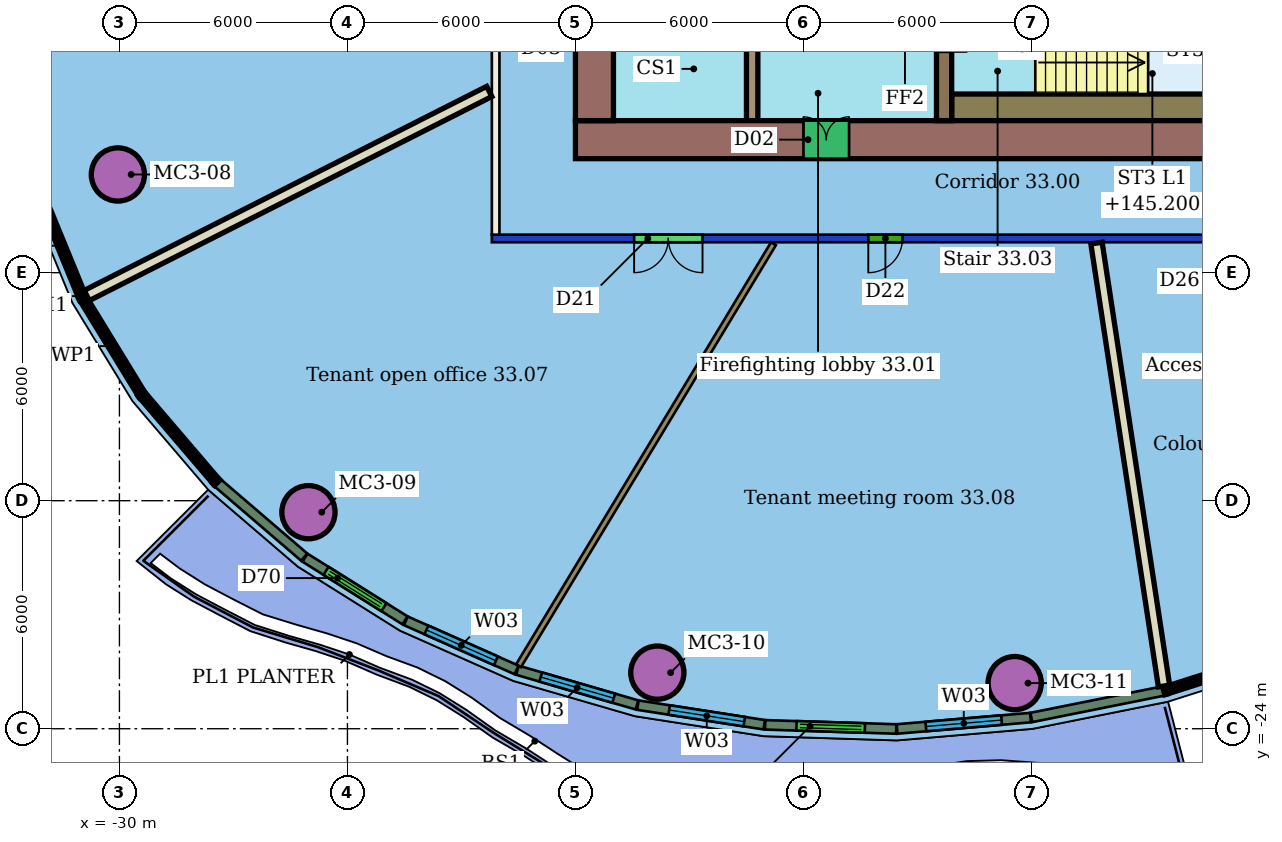
"""IFC4 building model, lengths in metres.
Left out: names, types, materials, properties, quantities, classifications, styles, units other than length and angle.
Written with IfcOpenShell. Run it as: python <this file> out.ifc"""

import sys

from ifc_helpers import new_model, si_unit, direction, frame, frame_2d, origin, origin_2d, place, context, subcontext, project, spatial, rectangle, hollow_circle, extrude, element, fill, save


model = new_model("IFC4")
c1 = context("Model", 3, precision=1e-05, world=origin(), true_north=direction((0.0, 1.0)))
c2 = subcontext(c1, "Body", "Model", "MODEL_VIEW")
j1 = project(units=[si_unit("LENGTHUNIT", "METRE"), si_unit("PLANEANGLEUNIT", "RADIAN")], contexts=[c1])
p1 = place(None, origin())
s1 = spatial("IfcSite", under=j1, at=p1, CompositionType="ELEMENT")
p2 = place(p1, origin())
s2 = spatial("IfcBuilding", under=s1, at=p2, CompositionType="ELEMENT")
p3 = place(p2, frame((0.0, 0.0, 143.4)))
s3 = spatial("IfcBuildingStorey", under=s2, at=p3, CompositionType="ELEMENT", Elevation=143.4)
for number, where, z_axis, x_axis in (
    (1, (-30.041, -9.417, 0.0), (0.0, 0.0, 1.0), (1.0, 0.0, 0.0)),
    (2, (-25.026, -18.303, 0.0), (0.0, 0.0, 1.0), (1.0, 0.0, 0.0)),
    (3, (-15.845, -22.524, 0.0), (0.0, 0.0, 1.0), (1.0, 0.0, 0.0)),
    (4, (-6.442, -22.8, 0.0), (0.0, 0.0, 1.0), (1.0, 0.0, 0.0)),
):
    element("IfcColumn", number, at=place(p3, frame(where, z_axis=z_axis, x_axis=x_axis)), inside=s3, PredefinedType="COLUMN", context=c2, shape_type="SweptSolid", body=[
        extrude(hollow_circle(Radius=0.7, WallThickness=0.05, at=origin_2d()), origin(), (0.0, 0.0, 1.0), 3.45),
    ])
p4 = place(p3, frame((8.2, -11.1, 0.0), z_axis=(0.0, 0.0, 1.0), x_axis=(-1.0, 0.0, 0.0)))
e5 = element("IfcWall", 5, at=p4, inside=s3, PredefinedType="PARTITIONING", context=c2, shape_type="SweptSolid", body=[
    extrude(rectangle(XDim=28.4, YDim=0.2, at=frame_2d((14.2, 0.0))), origin(), (0.0, 0.0, 1.0), 3.05),
])
p5 = place(p4, frame((22.856, 0.0, 0.0)))
e6 = element("IfcOpeningElement", 6, at=p5, cuts=e5, PredefinedType="OPENING", context=c2, shape_type="SweptSolid", body=[
    extrude(rectangle(XDim=1.8, YDim=2.1, at=frame_2d((0.9, 1.05))), frame((0.0, 0.11, 0.0), z_axis=(0.0, -1.0, 0.0), x_axis=(1.0, 0.0, 0.0)), (0.0, 0.0, 1.0), 0.22),
])
p6 = place(p4, frame((17.594, 0.0, 0.0)))
e7 = element("IfcOpeningElement", 7, at=p6, cuts=e5, PredefinedType="OPENING", context=c2, shape_type="SweptSolid", body=[
    extrude(rectangle(XDim=0.9, YDim=2.1, at=frame_2d((0.45, 1.05))), frame((0.0, 0.11, 0.0), z_axis=(0.0, -1.0, 0.0), x_axis=(1.0, 0.0, 0.0)), (0.0, 0.0, 1.0), 0.22),
])
p7 = place(p4, frame((7.819, 0.0, 0.0)))
e8 = element("IfcOpeningElement", 8, at=p7, cuts=e5, PredefinedType="OPENING", context=c2, shape_type="SweptSolid", body=[
    extrude(rectangle(XDim=1.2, YDim=2.1, at=frame_2d((0.6, 1.05))), frame((0.0, 0.11, 0.0), z_axis=(0.0, -1.0, 0.0), x_axis=(1.0, 0.0, 0.0)), (0.0, 0.0, 1.0), 0.22),
])
p8 = place(p3, frame((-20.1, -11.0, 0.0), z_axis=(0.0, 0.0, 1.0), x_axis=(0.0, 1.0, 0.0)))
e9 = element("IfcWall", 9, at=p8, inside=s3, PredefinedType="PARTITIONING", context=c2, shape_type="SweptSolid", body=[
    extrude(rectangle(XDim=22.0, YDim=0.2, at=frame_2d((11.0, 0.0))), origin(), (0.0, 0.0, 1.0), 3.45),
])
p9 = place(p8, frame((15.305, 0.0, 0.0)))
e10 = element("IfcOpeningElement", 10, at=p9, cuts=e9, PredefinedType="OPENING", context=c2, shape_type="SweptSolid", body=[
    extrude(rectangle(XDim=1.0, YDim=2.1, at=frame_2d((0.5, 1.05))), frame((0.0, 0.11, 0.0), z_axis=(0.0, -1.0, 0.0), x_axis=(1.0, 0.0, 0.0)), (0.0, 0.0, 1.0), 0.22),
])
p10 = place(p8, frame((9.542, 0.0, 0.0)))
e11 = element("IfcOpeningElement", 11, at=p10, cuts=e9, PredefinedType="OPENING", context=c2, shape_type="SweptSolid", body=[
    extrude(rectangle(XDim=1.8, YDim=2.4, at=frame_2d((0.9, 1.2))), frame((0.0, 0.11, 0.0), z_axis=(0.0, -1.0, 0.0), x_axis=(1.0, 0.0, 0.0)), (0.0, 0.0, 1.0), 0.22),
])
p11 = place(p3, frame((-30.86, -12.601, 0.0), z_axis=(0.0, 0.0, 1.0), x_axis=(0.891954750919, 0.452124675629, 0.0)))
e12 = element("IfcWall", 12, at=p11, inside=s3, PredefinedType="PARTITIONING", context=c2, shape_type="SweptSolid", body=[
    extrude(rectangle(XDim=11.875, YDim=0.3, at=frame_2d((5.938, 0.0))), origin(), (0.0, 0.0, 1.0), 3.45),
])
p12 = place(p3, frame((-19.496, -22.34, 0.0), z_axis=(0.0, 0.0, 1.0), x_axis=(0.51707886648, 0.855937758157, 0.0)))
e13 = element("IfcWall", 13, at=p12, inside=s3, PredefinedType="PARTITIONING", context=c2, shape_type="SweptSolid", body=[
    extrude(rectangle(XDim=12.97, YDim=0.15, at=frame_2d((6.485, 0.0))), origin(), (0.0, 0.0, 1.0), 3.45),
])
p13 = place(p3, frame((-2.512, -22.877, 0.0), z_axis=(0.0, 0.0, 1.0), x_axis=(-0.15070468476, 0.988578827404, 0.0)))
e14 = element("IfcWall", 14, at=p13, inside=s3, PredefinedType="PARTITIONING", context=c2, shape_type="SweptSolid", body=[
    extrude(rectangle(XDim=11.789, YDim=0.3, at=frame_2d((5.894, 0.0))), origin(), (0.0, 0.0, 1.0), 3.45),
])
p14 = place(p3, frame((-27.411, -17.534, 0.0), z_axis=(0.0, 0.0, 1.0), x_axis=(0.75908968864, -0.650986055611, 0.0)))
e15 = element("IfcWall", 15, at=p14, inside=s3, PredefinedType="SOLIDWALL", context=c2, shape_type="SweptSolid", body=[
    extrude(rectangle(XDim=2.995, YDim=0.25, at=frame_2d((1.497, 0.0))), origin(), (0.0, 0.0, 1.0), 3.1),
])
p15 = place(p3, frame((-25.117, -19.499, 0.0), z_axis=(0.0, 0.0, 1.0), x_axis=(0.847326168921, -0.531072841954, 0.0)))
e16 = element("IfcWall", 16, at=p15, inside=s3, PredefinedType="SOLIDWALL", context=c2, shape_type="SweptSolid", body=[
    extrude(rectangle(XDim=3.105, YDim=0.25, at=frame_2d((1.552, 0.0))), origin(), (0.0, 0.0, 1.0), 3.1),
])
p16 = place(p15, frame((0.652, 0.0, 0.0)))
e17 = element("IfcOpeningElement", 17, at=p16, cuts=e16, PredefinedType="OPENING", context=c2, shape_type="SweptSolid", body=[
    extrude(rectangle(XDim=1.8, YDim=2.4, at=frame_2d((0.9, 1.2))), frame((0.0, 0.135, 0.0), z_axis=(0.0, -1.0, 0.0), x_axis=(1.0, 0.0, 0.0)), (0.0, 0.0, 1.0), 0.27),
])
p17 = place(p3, frame((-22.463, -21.16, 0.0), z_axis=(0.0, 0.0, 1.0), x_axis=(0.91407040375, -0.405555541188, 0.0)))
e18 = element("IfcWall", 18, at=p17, inside=s3, PredefinedType="SOLIDWALL", context=c2, shape_type="SweptSolid", body=[
    extrude(rectangle(XDim=3.187, YDim=0.25, at=frame_2d((1.594, 0.0))), origin(), (0.0, 0.0, 1.0), 3.1),
])
p18 = place(p17, frame((0.594, 0.0, 0.9)))
e19 = element("IfcOpeningElement", 19, at=p18, cuts=e18, PredefinedType="OPENING", context=c2, shape_type="SweptSolid", body=[
    extrude(rectangle(XDim=2.0, YDim=2.1, at=frame_2d((1.0, 1.05))), frame((0.0, 0.135, 0.0), z_axis=(0.0, -1.0, 0.0), x_axis=(1.0, 0.0, 0.0)), (0.0, 0.0, 1.0), 0.27),
])
p19 = place(p3, frame((-19.527, -22.461, 0.0), z_axis=(0.0, 0.0, 1.0), x_axis=(0.960393845313, -0.278646123041, 0.0)))
e20 = element("IfcWall", 20, at=p19, inside=s3, PredefinedType="SOLIDWALL", context=c2, shape_type="SweptSolid", body=[
    extrude(rectangle(XDim=3.276, YDim=0.25, at=frame_2d((1.638, 0.0))), origin(), (0.0, 0.0, 1.0), 3.1),
])
p20 = place(p19, frame((0.638, 0.0, 0.9)))
e21 = element("IfcOpeningElement", 21, at=p20, cuts=e20, PredefinedType="OPENING", context=c2, shape_type="SweptSolid", body=[
    extrude(rectangle(XDim=2.0, YDim=2.1, at=frame_2d((1.0, 1.05))), frame((0.0, 0.135, 0.0), z_axis=(0.0, -1.0, 0.0), x_axis=(1.0, 0.0, 0.0)), (0.0, 0.0, 1.0), 0.27),
])
p21 = place(p3, frame((-16.357, -23.379, 0.0), z_axis=(0.0, 0.0, 1.0), x_axis=(0.988171249995, -0.153354428314, 0.0)))
e22 = element("IfcWall", 22, at=p21, inside=s3, PredefinedType="SOLIDWALL", context=c2, shape_type="SweptSolid", body=[
    extrude(rectangle(XDim=3.365, YDim=0.25, at=frame_2d((1.683, 0.0))), origin(), (0.0, 0.0, 1.0), 3.1),
])
p22 = place(p21, frame((0.833, 0.0, 0.9)))
e23 = element("IfcOpeningElement", 23, at=p22, cuts=e22, PredefinedType="OPENING", context=c2, shape_type="SweptSolid", body=[
    extrude(rectangle(XDim=2.0, YDim=2.1, at=frame_2d((1.0, 1.05))), frame((0.0, 0.135, 0.0), z_axis=(0.0, -1.0, 0.0), x_axis=(1.0, 0.0, 0.0)), (0.0, 0.0, 1.0), 0.27),
])
p23 = place(p3, frame((-13.008, -23.897, 0.0), z_axis=(0.0, 0.0, 1.0), x_axis=(0.999495013577, -0.031776057572, 0.0)))
e24 = element("IfcWall", 24, at=p23, inside=s3, PredefinedType="SOLIDWALL", context=c2, shape_type="SweptSolid", body=[
    extrude(rectangle(XDim=3.45, YDim=0.25, at=frame_2d((1.725, 0.0))), origin(), (0.0, 0.0, 1.0), 3.1),
])
p24 = place(p23, frame((0.825, 0.0, 0.0)))
e25 = element("IfcOpeningElement", 25, at=p24, cuts=e24, PredefinedType="OPENING", context=c2, shape_type="SweptSolid", body=[
    extrude(rectangle(XDim=1.8, YDim=2.4, at=frame_2d((0.9, 1.2))), frame((0.0, 0.135, 0.0), z_axis=(0.0, -1.0, 0.0), x_axis=(1.0, 0.0, 0.0)), (0.0, 0.0, 1.0), 0.27),
])
p25 = place(p3, frame((-9.537, -24.007, 0.0), z_axis=(0.0, 0.0, 1.0), x_axis=(0.996379423163, 0.085017910447, 0.0)))
e26 = element("IfcWall", 26, at=p25, inside=s3, PredefinedType="SOLIDWALL", context=c2, shape_type="SweptSolid", body=[
    extrude(rectangle(XDim=3.523, YDim=0.25, at=frame_2d((1.762, 0.0))), origin(), (0.0, 0.0, 1.0), 3.1),
])
p26 = place(p25, frame((0.762, 0.0, 0.9)))
e27 = element("IfcOpeningElement", 27, at=p26, cuts=e26, PredefinedType="OPENING", context=c2, shape_type="SweptSolid", body=[
    extrude(rectangle(XDim=2.0, YDim=2.1, at=frame_2d((1.0, 1.05))), frame((0.0, 0.135, 0.0), z_axis=(0.0, -1.0, 0.0), x_axis=(1.0, 0.0, 0.0)), (0.0, 0.0, 1.0), 0.27),
])
p27 = place(p3, frame((-6.005, -23.704, 0.0), z_axis=(0.0, 0.0, 1.0), x_axis=(0.980503643001, 0.196500906007, 0.0)))
e28 = element("IfcWall", 28, at=p27, inside=s3, PredefinedType="SOLIDWALL", context=c2, shape_type="SweptSolid", body=[
    extrude(rectangle(XDim=3.539, YDim=0.25, at=frame_2d((1.769, 0.0))), origin(), (0.0, 0.0, 1.0), 3.1),
])
p28 = place(p3, frame((-18.0, -8.5, 0.0), z_axis=(0.0, 0.0, 1.0), x_axis=(1.0, 0.0, 0.0)))
e29 = element("IfcWall", 29, at=p28, inside=s3, PredefinedType="SHEAR", context=c2, shape_type="SweptSolid", body=[
    extrude(rectangle(XDim=24.0, YDim=1.0, at=frame_2d((12.0, 0.0))), origin(), (0.0, 0.0, 1.0), 3.3),
])
p29 = place(p28, frame((6.0, 0.0, 0.0)))
e30 = element("IfcOpeningElement", 30, at=p29, cuts=e29, PredefinedType="OPENING", context=c2, shape_type="SweptSolid", body=[
    extrude(rectangle(XDim=1.2, YDim=2.1, at=frame_2d((0.6, 1.05))), frame((0.0, 0.51, 0.0), z_axis=(0.0, -1.0, 0.0), x_axis=(1.0, 0.0, 0.0)), (0.0, 0.0, 1.0), 1.02),
])
p30 = place(p3, frame((-17.5, 8.0, 0.0), z_axis=(0.0, 0.0, 1.0), x_axis=(0.0, -1.0, 0.0)))
e31 = element("IfcWall", 31, at=p30, inside=s3, PredefinedType="SHEAR", context=c2, shape_type="SweptSolid", body=[
    extrude(rectangle(XDim=16.0, YDim=1.0, at=frame_2d((8.0, 0.0))), origin(), (0.0, 0.0, 1.0), 3.3),
])
p31 = place(p30, frame((11.9, 0.0, 0.0)))
e32 = element("IfcOpeningElement", 32, at=p31, cuts=e31, PredefinedType="OPENING", context=c2, shape_type="SweptSolid", body=[
    extrude(rectangle(XDim=1.2, YDim=2.1, at=frame_2d((0.6, 1.05))), frame((0.0, 0.51, 0.0), z_axis=(0.0, -1.0, 0.0), x_axis=(1.0, 0.0, 0.0)), (0.0, 0.0, 1.0), 1.02),
])
p32 = place(p30, frame((2.9, 0.0, 0.0)))
e33 = element("IfcOpeningElement", 33, at=p32, cuts=e31, PredefinedType="OPENING", context=c2, shape_type="SweptSolid", body=[
    extrude(rectangle(XDim=1.2, YDim=2.1, at=frame_2d((0.6, 1.05))), frame((0.0, 0.51, 0.0), z_axis=(0.0, -1.0, 0.0), x_axis=(1.0, 0.0, 0.0)), (0.0, 0.0, 1.0), 1.02),
])
p33 = place(p3, frame((-13.35, 8.0, 0.0), z_axis=(0.0, 0.0, 1.0), x_axis=(0.0, -1.0, 0.0)))
e34 = element("IfcWall", 34, at=p33, inside=s3, PredefinedType="SHEAR", context=c2, shape_type="SweptSolid", body=[
    extrude(rectangle(XDim=16.0, YDim=0.3, at=frame_2d((8.0, 0.0))), origin(), (0.0, 0.0, 1.0), 3.3),
])
p34 = place(p33, frame((7.25, 0.0, 0.0)))
e35 = element("IfcOpeningElement", 35, at=p34, cuts=e34, PredefinedType="OPENING", context=c2, shape_type="SweptSolid", body=[
    extrude(rectangle(XDim=1.5, YDim=2.1, at=frame_2d((0.75, 1.05))), frame((0.0, 0.16, 0.0), z_axis=(0.0, -1.0, 0.0), x_axis=(1.0, 0.0, 0.0)), (0.0, 0.0, 1.0), 0.32),
])
p35 = place(p3, frame((-8.3, -3.88, 0.0), z_axis=(0.0, 0.0, 1.0), x_axis=(0.0, -1.0, 0.0)))
e36 = element("IfcWall", 36, at=p35, inside=s3, PredefinedType="SHEAR", context=c2, shape_type="SweptSolid", body=[
    extrude(rectangle(XDim=4.12, YDim=0.4, at=frame_2d((2.06, 0.0))), origin(), (0.0, 0.0, 1.0), 3.3),
])
p36 = place(p35, frame((1.11, 0.0, 0.0)))
e37 = element("IfcOpeningElement", 37, at=p36, cuts=e36, PredefinedType="OPENING", context=c2, shape_type="SweptSolid", body=[
    extrude(rectangle(XDim=1.2, YDim=2.1, at=frame_2d((0.6, 1.05))), frame((0.0, 0.21, 0.0), z_axis=(0.0, -1.0, 0.0), x_axis=(1.0, 0.0, 0.0)), (0.0, 0.0, 1.0), 0.42),
])
p37 = place(p3, frame((-8.1, -7.65, 0.0), z_axis=(0.0, 0.0, 1.0), x_axis=(1.0, 0.0, 0.0)))
e38 = element("IfcWall", 38, at=p37, inside=s3, PredefinedType="SHEAR", context=c2, shape_type="SweptSolid", body=[
    extrude(rectangle(XDim=7.05, YDim=0.7, at=frame_2d((3.525, 0.0))), origin(), (0.0, 0.0, 1.0), 3.3),
])
p38 = place(p5, origin())
e39 = element("IfcDoor", 39, at=p38, inside=s3, OperationType="DOUBLE_DOOR_SINGLE_SWING", PredefinedType="DOOR", context=c2, shape_type="SweptSolid", body=[
    extrude(rectangle(XDim=1.8, YDim=2.1, at=frame_2d((0.9, 1.05))), frame((0.0, 0.025, 0.0), z_axis=(0.0, -1.0, 0.0), x_axis=(1.0, 0.0, 0.0)), (0.0, 0.0, 1.0), 0.05),
])
fill(e6, e39)
p39 = place(p6, origin())
e40 = element("IfcDoor", 40, at=p39, inside=s3, OperationType="SINGLE_SWING_RIGHT", PredefinedType="DOOR", context=c2, shape_type="SweptSolid", body=[
    extrude(rectangle(XDim=0.9, YDim=2.1, at=frame_2d((0.45, 1.05))), frame((0.0, 0.025, 0.0), z_axis=(0.0, -1.0, 0.0), x_axis=(1.0, 0.0, 0.0)), (0.0, 0.0, 1.0), 0.05),
])
fill(e7, e40)
p40 = place(p16, origin())
e41 = element("IfcDoor", 41, at=p40, inside=s3, OperationType="DOUBLE_DOOR_SLIDING", PredefinedType="DOOR", context=c2, shape_type="SweptSolid", body=[
    extrude(rectangle(XDim=1.8, YDim=2.4, at=frame_2d((0.9, 1.2))), frame((0.0, 0.025, 0.0), z_axis=(0.0, -1.0, 0.0), x_axis=(1.0, 0.0, 0.0)), (0.0, 0.0, 1.0), 0.05),
])
fill(e17, e41)
p41 = place(p18, origin())
e42 = element("IfcWindow", 42, at=p41, inside=s3, PartitioningType="SINGLE_PANEL", PredefinedType="WINDOW", context=c2, shape_type="SweptSolid", body=[
    extrude(rectangle(XDim=2.0, YDim=2.1, at=frame_2d((1.0, 1.05))), frame((0.0, 0.03, 0.0), z_axis=(0.0, -1.0, 0.0), x_axis=(1.0, 0.0, 0.0)), (0.0, 0.0, 1.0), 0.06),
])
fill(e19, e42)
p42 = place(p20, origin())
e43 = element("IfcWindow", 43, at=p42, inside=s3, PartitioningType="SINGLE_PANEL", PredefinedType="WINDOW", context=c2, shape_type="SweptSolid", body=[
    extrude(rectangle(XDim=2.0, YDim=2.1, at=frame_2d((1.0, 1.05))), frame((0.0, 0.03, 0.0), z_axis=(0.0, -1.0, 0.0), x_axis=(1.0, 0.0, 0.0)), (0.0, 0.0, 1.0), 0.06),
])
fill(e21, e43)
p43 = place(p22, origin())
e44 = element("IfcWindow", 44, at=p43, inside=s3, PartitioningType="SINGLE_PANEL", PredefinedType="WINDOW", context=c2, shape_type="SweptSolid", body=[
    extrude(rectangle(XDim=2.0, YDim=2.1, at=frame_2d((1.0, 1.05))), frame((0.0, 0.03, 0.0), z_axis=(0.0, -1.0, 0.0), x_axis=(1.0, 0.0, 0.0)), (0.0, 0.0, 1.0), 0.06),
])
fill(e23, e44)
p44 = place(p24, origin())
e45 = element("IfcDoor", 45, at=p44, inside=s3, OperationType="DOUBLE_DOOR_SLIDING", PredefinedType="DOOR", context=c2, shape_type="SweptSolid", body=[
    extrude(rectangle(XDim=1.8, YDim=2.4, at=frame_2d((0.9, 1.2))), frame((0.0, 0.025, 0.0), z_axis=(0.0, -1.0, 0.0), x_axis=(1.0, 0.0, 0.0)), (0.0, 0.0, 1.0), 0.05),
])
fill(e25, e45)
p45 = place(p26, origin())
e46 = element("IfcWindow", 46, at=p45, inside=s3, PartitioningType="SINGLE_PANEL", PredefinedType="WINDOW", context=c2, shape_type="SweptSolid", body=[
    extrude(rectangle(XDim=2.0, YDim=2.1, at=frame_2d((1.0, 1.05))), frame((0.0, 0.03, 0.0), z_axis=(0.0, -1.0, 0.0), x_axis=(1.0, 0.0, 0.0)), (0.0, 0.0, 1.0), 0.06),
])
fill(e27, e46)
p46 = place(p29, origin())
e47 = element("IfcDoor", 47, at=p46, inside=s3, OperationType="DOUBLE_DOOR_SINGLE_SWING", PredefinedType="NOTDEFINED", context=c2, shape_type="SweptSolid", body=[
    extrude(rectangle(XDim=1.2, YDim=2.1, at=frame_2d((0.6, 1.05))), frame((0.0, 0.025, 0.0), z_axis=(0.0, -1.0, 0.0), x_axis=(1.0, 0.0, 0.0)), (0.0, 0.0, 1.0), 0.05),
])
fill(e30, e47)
save(model, sys.argv[1])
